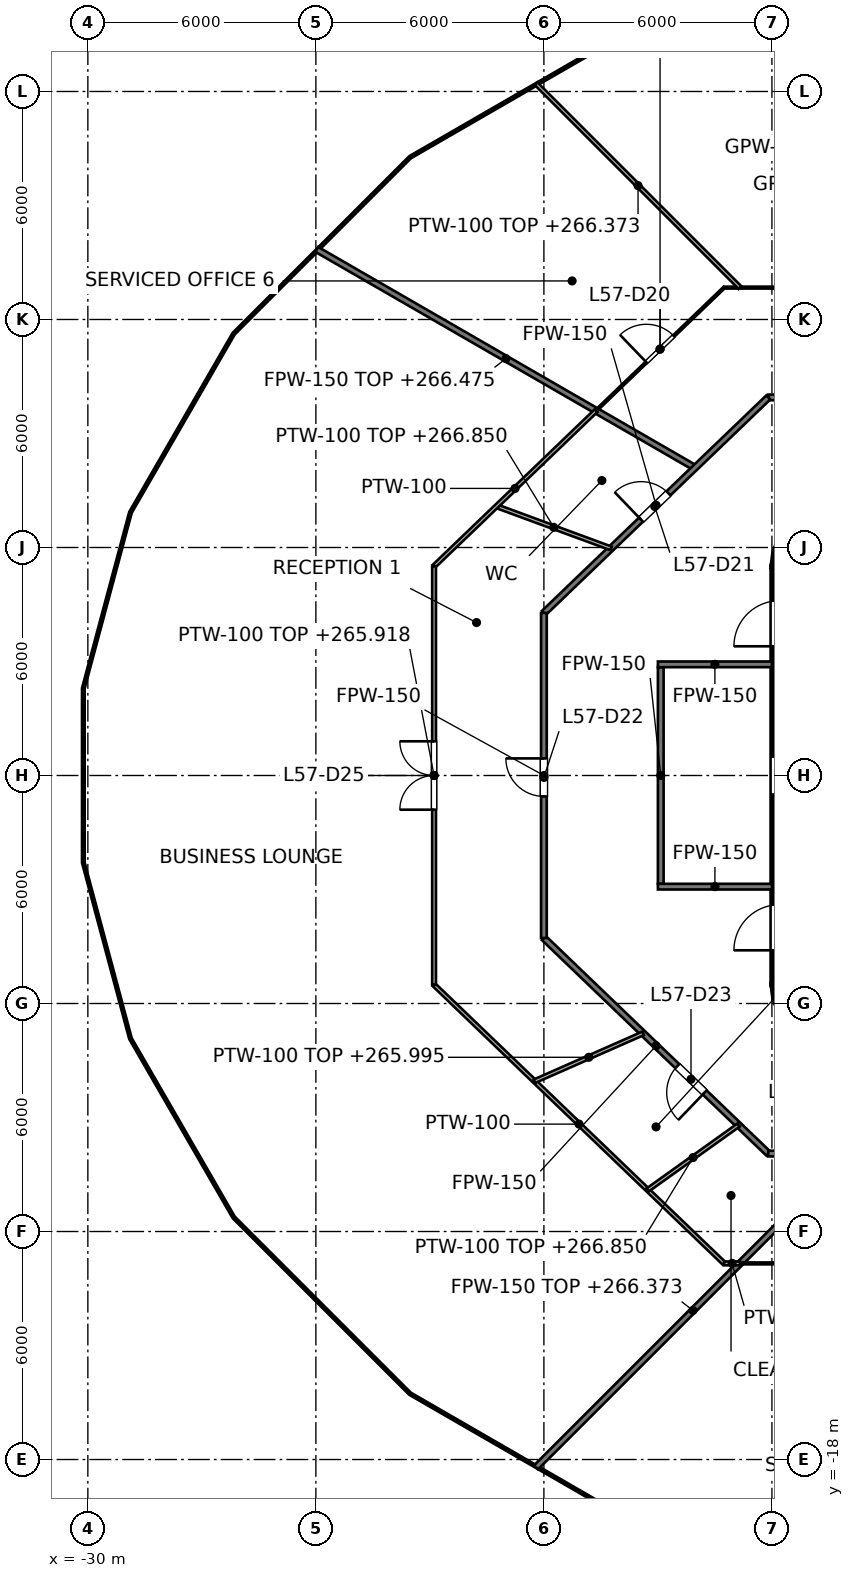
"""IFC4 building model, lengths in metres.
Left out: names, types, materials, properties, quantities, classifications, styles, units other than length and angle.
Written with IfcOpenShell. Run it as: python <this file> out.ifc"""

import sys

from ifc_helpers import new_model, si_unit, direction, frame, frame_2d, origin, place, context, subcontext, project, spatial, polyline, rectangle, outline, extrude, element, fill, save


model = new_model("IFC4")
c1 = context("Model", 3, precision=1e-05, world=origin(), true_north=direction((0.0, 1.0)))
c2 = subcontext(c1, "Body", "Model", "MODEL_VIEW")
j1 = project(units=[si_unit("LENGTHUNIT", "METRE"), si_unit("PLANEANGLEUNIT", "RADIAN")], contexts=[c1])
p1 = place(None, origin())
s1 = spatial("IfcSite", under=j1, at=p1, CompositionType="ELEMENT")
p2 = place(p1, origin())
s2 = spatial("IfcBuilding", under=s1, at=p2, CompositionType="ELEMENT")
p3 = place(p2, frame((0.0, 0.0, 263.0)))
s3 = spatial("IfcBuildingStorey", under=s2, at=p3, CompositionType="ELEMENT", Elevation=263.0)
p4 = place(p3, frame((-11.8, -5.5, 0.0), z_axis=(0.0, 0.0, 1.0), x_axis=(0.0, 1.0, 0.0)))
e1 = element("IfcWall", 1, at=p4, inside=s3, PredefinedType="SHEAR", context=c2, shape_type="SweptSolid", body=[
    extrude(rectangle(XDim=11.0, YDim=0.4, at=frame_2d((5.5, 0.0))), origin(), (0.0, 0.0, 1.0), 4.0),
])
p5 = place(p4, frame((5.0, 0.0, 0.0)))
e2 = element("IfcOpeningElement", 2, at=p5, cuts=e1, PredefinedType="OPENING", context=c2, shape_type="SweptSolid", body=[
    extrude(rectangle(XDim=1.0, YDim=2.1, at=frame_2d((0.5, 1.05))), frame((0.0, 0.2, 0.0), z_axis=(0.0, -1.0, 0.0), x_axis=(1.0, 0.0, 0.0)), (0.0, 0.0, 1.0), 0.4),
])
p6 = place(p4, frame((0.9, 0.0, 0.0)))
e3 = element("IfcOpeningElement", 3, at=p6, cuts=e1, PredefinedType="OPENING", context=c2, shape_type="SweptSolid", body=[
    extrude(rectangle(XDim=1.2, YDim=2.1, at=frame_2d((0.6, 1.05))), frame((0.0, 0.2, 0.0), z_axis=(0.0, -1.0, 0.0), x_axis=(1.0, 0.0, 0.0)), (0.0, 0.0, 1.0), 0.4),
])
p7 = place(p4, frame((8.9, 0.0, 0.0)))
e4 = element("IfcOpeningElement", 4, at=p7, cuts=e1, PredefinedType="OPENING", context=c2, shape_type="SweptSolid", body=[
    extrude(rectangle(XDim=1.2, YDim=2.1, at=frame_2d((0.6, 1.05))), frame((0.0, 0.2, 0.0), z_axis=(0.0, -1.0, 0.0), x_axis=(1.0, 0.0, 0.0)), (0.0, 0.0, 1.0), 0.4),
])
p8 = place(p3, origin())
e5 = element("IfcWall", 5, at=p8, inside=s3, PredefinedType="SHEAR", context=c2, shape_type="SweptSolid", body=[
    extrude(outline(polyline([(-12.0, 5.5), (-11.596, 5.5), (-11.559, 5.784), (-11.45, 6.048), (-11.275, 6.275), (-11.048, 6.45), (-10.784, 6.559), (-10.5, 6.596), (-10.5, 7.0), (-10.888, 6.949), (-11.25, 6.799), (-11.561, 6.561), (-11.799, 6.25), (-11.949, 5.888), (-12.0, 5.5)])), origin(), (0.0, 0.0, 1.0), 4.0),
])
e6 = element("IfcWall", 6, at=p8, inside=s3, PredefinedType="SHEAR", context=c2, shape_type="SweptSolid", body=[
    extrude(outline(polyline([(-10.5, -7.0), (-10.5, -6.596), (-10.784, -6.559), (-11.048, -6.45), (-11.275, -6.275), (-11.45, -6.048), (-11.559, -5.784), (-11.596, -5.5), (-12.0, -5.5), (-11.949, -5.888), (-11.799, -6.25), (-11.561, -6.561), (-11.25, -6.799), (-10.888, -6.949), (-10.5, -7.0)])), origin(), (0.0, 0.0, 1.0), 4.0),
])
p9 = place(p3, frame((-14.925, -2.85, 0.0), z_axis=(0.0, 0.0, 1.0), x_axis=(0.0, 1.0, 0.0)))
e7 = element("IfcWall", 7, at=p9, inside=s3, PredefinedType="PARTITIONING", context=c2, shape_type="SweptSolid", body=[
    extrude(rectangle(XDim=5.7, YDim=0.15, at=frame_2d((2.85, 0.0))), origin(), (0.0, 0.0, 1.0), 2.918),
])
for number, where, z_axis, x_axis in (
    (8, (-15.0, 2.925, 0.0), (0.0, 0.0, 1.0), (1.0, 0.0, 0.0)),
    (9, (-15.0, -2.925, 0.0), (0.0, 0.0, 1.0), (1.0, 0.0, 0.0)),
):
    element("IfcWall", number, at=place(p3, frame(where, z_axis=z_axis, x_axis=x_axis)), inside=s3, PredefinedType="PARTITIONING", context=c2, shape_type="SweptSolid", body=[
        extrude(rectangle(XDim=3.0, YDim=0.15, at=frame_2d((1.5, 0.0))), origin(), (0.0, 0.0, 1.0), 2.918),
    ])
p10 = place(p3, frame((-18.0, -4.278, 0.0), z_axis=(0.0, 0.0, 1.0), x_axis=(0.721290181137, -0.692633001376, 0.0)))
e10 = element("IfcWall", 10, at=p10, inside=s3, PredefinedType="PARTITIONING", context=c2, shape_type="SweptSolid", body=[
    extrude(rectangle(XDim=8.187, YDim=0.15, at=frame_2d((4.094, 0.0))), origin(), (0.0, 0.0, 1.0), 2.918),
])
p11 = place(p10, frame((4.866, 0.0, 0.0)))
e11 = element("IfcOpeningElement", 11, at=p11, cuts=e10, PredefinedType="OPENING", context=c2, shape_type="SweptSolid", body=[
    extrude(rectangle(XDim=1.0, YDim=2.1, at=frame_2d((0.5, 1.05))), frame((0.0, 0.075, 0.0), z_axis=(0.0, -1.0, 0.0), x_axis=(1.0, 0.0, 0.0)), (0.0, 0.0, 1.0), 0.15),
])
p12 = place(p3, frame((-23.976, 13.843, 0.0), z_axis=(0.0, 0.0, 1.0), x_axis=(0.866017183011, -0.500014238528, 0.0)))
e12 = element("IfcWall", 12, at=p12, inside=s3, PredefinedType="PARTITIONING", context=c2, shape_type="SweptSolid", body=[
    extrude(rectangle(XDim=11.492, YDim=0.15, at=frame_2d((5.746, 0.0))), origin(), (0.0, 0.0, 1.0), 3.475),
])
p13 = place(p3, frame((-12.095, -9.949, 0.0), z_axis=(0.0, 0.0, 1.0), x_axis=(1.0, 0.0, 0.0)))
e13 = element("IfcWall", 13, at=p13, inside=s3, PredefinedType="PARTITIONING", context=c2, shape_type="SweptSolid", body=[
    extrude(rectangle(XDim=24.19, YDim=0.15, at=frame_2d((12.095, 0.0))), origin(), (0.0, 0.0, 1.0), 2.927),
])
p14 = place(p13, frame((0.573, 0.0, 0.0)))
e14 = element("IfcOpeningElement", 14, at=p14, cuts=e13, PredefinedType="OPENING", context=c2, shape_type="SweptSolid", body=[
    extrude(rectangle(XDim=1.0, YDim=2.1, at=frame_2d((0.5, 1.05))), frame((0.0, 0.075, 0.0), z_axis=(0.0, -1.0, 0.0), x_axis=(1.0, 0.0, 0.0)), (0.0, 0.0, 1.0), 0.15),
])
p15 = place(p13, frame((5.966, 0.0, 0.0)))
e15 = element("IfcOpeningElement", 15, at=p15, cuts=e13, PredefinedType="OPENING", context=c2, shape_type="SweptSolid", body=[
    extrude(rectangle(XDim=1.0, YDim=2.1, at=frame_2d((0.5, 1.05))), frame((0.0, 0.075, 0.0), z_axis=(0.0, -1.0, 0.0), x_axis=(1.0, 0.0, 0.0)), (0.0, 0.0, 1.0), 0.15),
])
p16 = place(p13, frame((13.812, 0.0, 0.0)))
e16 = element("IfcOpeningElement", 16, at=p16, cuts=e13, PredefinedType="OPENING", context=c2, shape_type="SweptSolid", body=[
    extrude(rectangle(XDim=1.0, YDim=2.1, at=frame_2d((0.5, 1.05))), frame((0.0, 0.075, 0.0), z_axis=(0.0, -1.0, 0.0), x_axis=(1.0, 0.0, 0.0)), (0.0, 0.0, 1.0), 0.15),
])
p17 = place(p13, frame((19.879, 0.0, 0.0)))
e17 = element("IfcOpeningElement", 17, at=p17, cuts=e13, PredefinedType="OPENING", context=c2, shape_type="SweptSolid", body=[
    extrude(rectangle(XDim=1.0, YDim=2.1, at=frame_2d((0.5, 1.05))), frame((0.0, 0.075, 0.0), z_axis=(0.0, -1.0, 0.0), x_axis=(1.0, 0.0, 0.0)), (0.0, 0.0, 1.0), 0.15),
])
p18 = place(p3, frame((-12.095, 9.949, 0.0), z_axis=(0.0, 0.0, 1.0), x_axis=(1.0, 0.0, 0.0)))
e18 = element("IfcWall", 18, at=p18, inside=s3, PredefinedType="PARTITIONING", context=c2, shape_type="SweptSolid", body=[
    extrude(rectangle(XDim=24.19, YDim=0.15, at=frame_2d((12.095, 0.0))), origin(), (0.0, 0.0, 1.0), 2.927),
])
p19 = place(p18, frame((9.784, 0.0, 0.0)))
e19 = element("IfcOpeningElement", 19, at=p19, cuts=e18, PredefinedType="OPENING", context=c2, shape_type="SweptSolid", body=[
    extrude(rectangle(XDim=1.0, YDim=2.1, at=frame_2d((0.5, 1.05))), frame((0.0, 0.075, 0.0), z_axis=(0.0, -1.0, 0.0), x_axis=(1.0, 0.0, 0.0)), (0.0, 0.0, 1.0), 0.15),
])
p20 = place(p18, frame((5.56, 0.0, 0.0)))
e20 = element("IfcOpeningElement", 20, at=p20, cuts=e18, PredefinedType="OPENING", context=c2, shape_type="SweptSolid", body=[
    extrude(rectangle(XDim=1.0, YDim=2.1, at=frame_2d((0.5, 1.05))), frame((0.0, 0.075, 0.0), z_axis=(0.0, -1.0, 0.0), x_axis=(1.0, 0.0, 0.0)), (0.0, 0.0, 1.0), 0.15),
])
p21 = place(p18, frame((1.322, 0.0, 0.0)))
e21 = element("IfcOpeningElement", 21, at=p21, cuts=e18, PredefinedType="OPENING", context=c2, shape_type="SweptSolid", body=[
    extrude(rectangle(XDim=1.0, YDim=2.1, at=frame_2d((0.5, 1.05))), frame((0.0, 0.075, 0.0), z_axis=(0.0, -1.0, 0.0), x_axis=(1.0, 0.0, 0.0)), (0.0, 0.0, 1.0), 0.15),
])
p22 = place(p18, frame((19.104, 0.0, 0.0)))
e22 = element("IfcOpeningElement", 22, at=p22, cuts=e18, PredefinedType="OPENING", context=c2, shape_type="SweptSolid", body=[
    extrude(rectangle(XDim=1.0, YDim=2.1, at=frame_2d((0.5, 1.05))), frame((0.0, 0.075, 0.0), z_axis=(0.0, -1.0, 0.0), x_axis=(1.0, 0.0, 0.0)), (0.0, 0.0, 1.0), 0.15),
])
p23 = place(p18, frame((14.129, 0.0, 0.0)))
e23 = element("IfcOpeningElement", 23, at=p23, cuts=e18, PredefinedType="OPENING", context=c2, shape_type="SweptSolid", body=[
    extrude(rectangle(XDim=1.0, YDim=2.1, at=frame_2d((0.5, 1.05))), frame((0.0, 0.075, 0.0), z_axis=(0.0, -1.0, 0.0), x_axis=(1.0, 0.0, 0.0)), (0.0, 0.0, 1.0), 0.15),
])
p24 = place(p3, frame((-18.0, 4.278, 0.0), z_axis=(0.0, 0.0, 1.0), x_axis=(0.721260976692, 0.69266341285, 0.0)))
e24 = element("IfcWall", 24, at=p24, inside=s3, PredefinedType="PARTITIONING", context=c2, shape_type="SweptSolid", body=[
    extrude(rectangle(XDim=8.187, YDim=0.15, at=frame_2d((4.094, 0.0))), origin(), (0.0, 0.0, 1.0), 2.918),
])
p25 = place(p24, frame((3.544, 0.0, 0.0)))
e25 = element("IfcOpeningElement", 25, at=p25, cuts=e24, PredefinedType="OPENING", context=c2, shape_type="SweptSolid", body=[
    extrude(rectangle(XDim=1.0, YDim=2.1, at=frame_2d((0.5, 1.05))), frame((0.0, 0.075, 0.0), z_axis=(0.0, -1.0, 0.0), x_axis=(1.0, 0.0, 0.0)), (0.0, 0.0, 1.0), 0.15),
])
p26 = place(p3, frame((-18.206, -18.206, 0.0), z_axis=(0.0, 0.0, 1.0), x_axis=(0.707106781187, 0.707106781187, 0.0)))
e26 = element("IfcWall", 26, at=p26, inside=s3, PredefinedType="PARTITIONING", context=c2, shape_type="SweptSolid", body=[
    extrude(rectangle(XDim=11.677, YDim=0.15, at=frame_2d((5.839, 0.0))), origin(), (0.0, 0.0, 1.0), 3.373),
])
p27 = place(p3, frame((-18.0, -4.278, 0.0), z_axis=(0.0, 0.0, 1.0), x_axis=(0.0, 1.0, 0.0)))
e27 = element("IfcWall", 27, at=p27, inside=s3, PredefinedType="PARTITIONING", context=c2, shape_type="SweptSolid", body=[
    extrude(rectangle(XDim=8.556, YDim=0.15, at=frame_2d((4.278, 0.0))), origin(), (0.0, 0.0, 1.0), 2.918),
])
p28 = place(p27, frame((3.728, 0.0, 0.0)))
e28 = element("IfcOpeningElement", 28, at=p28, cuts=e27, PredefinedType="OPENING", context=c2, shape_type="SweptSolid", body=[
    extrude(rectangle(XDim=1.0, YDim=2.1, at=frame_2d((0.5, 1.05))), frame((0.0, 0.075, 0.0), z_axis=(0.0, -1.0, 0.0), x_axis=(1.0, 0.0, 0.0)), (0.0, 0.0, 1.0), 0.15),
])
p29 = place(p3, frame((-12.839, -12.839, 0.0), z_axis=(0.0, 0.0, 1.0), x_axis=(1.0, 0.0, 0.0)))
e29 = element("IfcWall", 29, at=p29, inside=s3, PredefinedType="PARTITIONING", context=c2, shape_type="SweptSolid", body=[
    extrude(rectangle(XDim=20.252, YDim=0.05, at=frame_2d((10.126, 0.0))), origin(), (0.0, 0.0, 1.0), 2.927),
])
p30 = place(p29, frame((5.024, 0.0, 0.0)))
e30 = element("IfcOpeningElement", 30, at=p30, cuts=e29, PredefinedType="OPENING", context=c2, shape_type="SweptSolid", body=[
    extrude(rectangle(XDim=1.0, YDim=2.1, at=frame_2d((0.5, 1.05))), frame((0.0, 0.025, 0.0), z_axis=(0.0, -1.0, 0.0), x_axis=(1.0, 0.0, 0.0)), (0.0, 0.0, 1.0), 0.05),
])
p31 = place(p29, frame((16.045, 0.0, 0.0)))
e31 = element("IfcOpeningElement", 31, at=p31, cuts=e29, PredefinedType="OPENING", context=c2, shape_type="SweptSolid", body=[
    extrude(rectangle(XDim=1.0, YDim=2.1, at=frame_2d((0.5, 1.05))), frame((0.0, 0.025, 0.0), z_axis=(0.0, -1.0, 0.0), x_axis=(1.0, 0.0, 0.0)), (0.0, 0.0, 1.0), 0.05),
])
p32 = place(p3, frame((-13.258, 12.839, 0.0), z_axis=(0.0, 0.0, 1.0), x_axis=(1.0, 0.0, 0.0)))
e32 = element("IfcWall", 32, at=p32, inside=s3, PredefinedType="PARTITIONING", context=c2, shape_type="SweptSolid", body=[
    extrude(rectangle(XDim=13.258, YDim=0.05, at=frame_2d((6.629, 0.0))), origin(), (0.0, 0.0, 1.0), 2.927),
])
p33 = place(p32, frame((11.038, 0.0, 0.0)))
e33 = element("IfcOpeningElement", 33, at=p33, cuts=e32, PredefinedType="OPENING", context=c2, shape_type="SweptSolid", body=[
    extrude(rectangle(XDim=1.0, YDim=2.1, at=frame_2d((0.5, 1.05))), frame((0.0, 0.025, 0.0), z_axis=(0.0, -1.0, 0.0), x_axis=(1.0, 0.0, 0.0)), (0.0, 0.0, 1.0), 0.05),
])
p34 = place(p32, frame((4.985, 0.0, 0.0)))
e34 = element("IfcOpeningElement", 34, at=p34, cuts=e32, PredefinedType="OPENING", context=c2, shape_type="SweptSolid", body=[
    extrude(rectangle(XDim=1.0, YDim=2.1, at=frame_2d((0.5, 1.05))), frame((0.0, 0.025, 0.0), z_axis=(0.0, -1.0, 0.0), x_axis=(1.0, 0.0, 0.0)), (0.0, 0.0, 1.0), 0.05),
])
p35 = place(p3, frame((-16.629, 9.601, 0.0), z_axis=(0.0, 0.0, 1.0), x_axis=(0.721171224294, 0.692756858681, 0.0)))
e35 = element("IfcWall", 35, at=p35, inside=s3, PredefinedType="PARTITIONING", context=c2, shape_type="SweptSolid", body=[
    extrude(rectangle(XDim=4.674, YDim=0.05, at=frame_2d((2.337, 0.0))), origin(), (0.0, 0.0, 1.0), 2.927),
])
p36 = place(p35, frame((1.837, 0.0, 0.0)))
e36 = element("IfcOpeningElement", 36, at=p36, cuts=e35, PredefinedType="OPENING", context=c2, shape_type="SweptSolid", body=[
    extrude(rectangle(XDim=1.0, YDim=2.1, at=frame_2d((0.5, 1.05))), frame((0.0, 0.025, 0.0), z_axis=(0.0, -1.0, 0.0), x_axis=(1.0, 0.0, 0.0)), (0.0, 0.0, 1.0), 0.05),
])
p37 = place(p3, frame((-18.206, 18.206, 0.0), z_axis=(0.0, 0.0, 1.0), x_axis=(0.707106781187, -0.707106781187, 0.0)))
e37 = element("IfcWall", 37, at=p37, inside=s3, PredefinedType="PARTITIONING", context=c2, shape_type="SweptSolid", body=[
    extrude(rectangle(XDim=7.59, YDim=0.1, at=frame_2d((3.795, 0.0))), origin(), (0.0, 0.0, 1.0), 3.373),
])
p38 = place(p3, frame((-20.89, -5.509, 0.0), z_axis=(0.0, 0.0, 1.0), x_axis=(0.721243919182, -0.692681174166, 0.0)))
e38 = element("IfcWall", 38, at=p38, inside=s3, PredefinedType="PARTITIONING", context=c2, shape_type="SweptSolid", body=[
    extrude(rectangle(XDim=10.582, YDim=0.1, at=frame_2d((5.291, 0.0))), origin(), (0.0, 0.0, 1.0), 2.927),
])
p39 = place(p3, frame((-19.247, 7.086, 0.0), z_axis=(0.0, 0.0, 1.0), x_axis=(0.938441676653, -0.345437721625, 0.0)))
e39 = element("IfcWall", 39, at=p39, inside=s3, PredefinedType="PARTITIONING", context=c2, shape_type="SweptSolid", body=[
    extrude(rectangle(XDim=3.213, YDim=0.1, at=frame_2d((1.606, 0.0))), origin(), (0.0, 0.0, 1.0), 3.85),
])
p40 = place(p3, frame((-13.258, -12.839, 0.0), z_axis=(0.0, 0.0, 1.0), x_axis=(1.0, 0.0, 0.0)))
e40 = element("IfcWall", 40, at=p40, inside=s3, PredefinedType="PARTITIONING", context=c2, shape_type="SweptSolid", body=[
    extrude(rectangle(XDim=0.419, YDim=0.1, at=frame_2d((0.209, 0.0))), origin(), (0.0, 0.0, 1.0), 3.85),
])
p41 = place(p3, frame((-18.249, -8.046, 0.0), z_axis=(0.0, 0.0, 1.0), x_axis=(0.915015337029, 0.403419053841, 0.0)))
e41 = element("IfcWall", 41, at=p41, inside=s3, PredefinedType="PARTITIONING", context=c2, shape_type="SweptSolid", body=[
    extrude(rectangle(XDim=3.126, YDim=0.1, at=frame_2d((1.563, 0.0))), origin(), (0.0, 0.0, 1.0), 2.995),
])
p42 = place(p3, frame((-15.27, -10.907, 0.0), z_axis=(0.0, 0.0, 1.0), x_axis=(0.813789563909, 0.581159655923, 0.0)))
e42 = element("IfcWall", 42, at=p42, inside=s3, PredefinedType="PARTITIONING", context=c2, shape_type="SweptSolid", body=[
    extrude(rectangle(XDim=2.941, YDim=0.1, at=frame_2d((1.47, 0.0))), origin(), (0.0, 0.0, 1.0), 3.85),
])
p43 = place(p3, frame((-20.89, 5.509, 0.0), z_axis=(0.0, 0.0, 1.0), x_axis=(0.721443476428, 0.692473328237, 0.0)))
e43 = element("IfcWall", 43, at=p43, inside=s3, PredefinedType="PARTITIONING", context=c2, shape_type="SweptSolid", body=[
    extrude(rectangle(XDim=5.907, YDim=0.1, at=frame_2d((2.954, 0.0))), origin(), (0.0, 0.0, 1.0), 2.927),
])
p44 = place(p3, frame((-20.89, -5.509, 0.0), z_axis=(0.0, 0.0, 1.0), x_axis=(0.0, 1.0, 0.0)))
e44 = element("IfcWall", 44, at=p44, inside=s3, PredefinedType="PARTITIONING", context=c2, shape_type="SweptSolid", body=[
    extrude(rectangle(XDim=11.018, YDim=0.1, at=frame_2d((5.509, 0.0))), origin(), (0.0, 0.0, 1.0), 2.918),
])
p45 = place(p44, frame((4.609, 0.0, 0.0)))
e45 = element("IfcOpeningElement", 45, at=p45, cuts=e44, PredefinedType="OPENING", context=c2, shape_type="SweptSolid", body=[
    extrude(rectangle(XDim=1.8, YDim=2.1, at=frame_2d((0.9, 1.05))), frame((0.0, 0.05, 0.0), z_axis=(0.0, -1.0, 0.0), x_axis=(1.0, 0.0, 0.0)), (0.0, 0.0, 1.0), 0.1),
])
p46 = place(p36, origin())
e46 = element("IfcDoor", 46, at=p46, inside=s3, OperationType="SINGLE_SWING_LEFT", PredefinedType="DOOR", context=c2, shape_type="SweptSolid", body=[
    extrude(rectangle(XDim=1.0, YDim=2.1, at=frame_2d((0.5, 1.05))), frame((0.0, 0.025, 0.0), z_axis=(0.0, -1.0, 0.0), x_axis=(1.0, 0.0, 0.0)), (0.0, 0.0, 1.0), 0.05),
])
fill(e36, e46)
p47 = place(p25, origin())
e47 = element("IfcDoor", 47, at=p47, inside=s3, OperationType="SINGLE_SWING_LEFT", PredefinedType="DOOR", context=c2, shape_type="SweptSolid", body=[
    extrude(rectangle(XDim=1.0, YDim=2.1, at=frame_2d((0.5, 1.05))), frame((0.0, 0.025, 0.0), z_axis=(0.0, -1.0, 0.0), x_axis=(1.0, 0.0, 0.0)), (0.0, 0.0, 1.0), 0.05),
])
fill(e25, e47)
p48 = place(p28, origin())
e48 = element("IfcDoor", 48, at=p48, inside=s3, OperationType="SINGLE_SWING_RIGHT", PredefinedType="DOOR", context=c2, shape_type="SweptSolid", body=[
    extrude(rectangle(XDim=1.0, YDim=2.1, at=frame_2d((0.5, 1.05))), frame((0.0, 0.025, 0.0), z_axis=(0.0, -1.0, 0.0), x_axis=(1.0, 0.0, 0.0)), (0.0, 0.0, 1.0), 0.05),
])
fill(e28, e48)
p49 = place(p11, origin())
e49 = element("IfcDoor", 49, at=p49, inside=s3, OperationType="SINGLE_SWING_RIGHT", PredefinedType="DOOR", context=c2, shape_type="SweptSolid", body=[
    extrude(rectangle(XDim=1.0, YDim=2.1, at=frame_2d((0.5, 1.05))), frame((0.0, 0.025, 0.0), z_axis=(0.0, -1.0, 0.0), x_axis=(1.0, 0.0, 0.0)), (0.0, 0.0, 1.0), 0.05),
])
fill(e11, e49)
p50 = place(p45, origin())
e50 = element("IfcDoor", 50, at=p50, inside=s3, OperationType="DOUBLE_DOOR_SINGLE_SWING", PredefinedType="DOOR", context=c2, shape_type="SweptSolid", body=[
    extrude(rectangle(XDim=1.8, YDim=2.1, at=frame_2d((0.9, 1.05))), frame((0.0, 0.025, 0.0), z_axis=(0.0, -1.0, 0.0), x_axis=(1.0, 0.0, 0.0)), (0.0, 0.0, 1.0), 0.05),
])
fill(e45, e50)
save(model, sys.argv[1])
